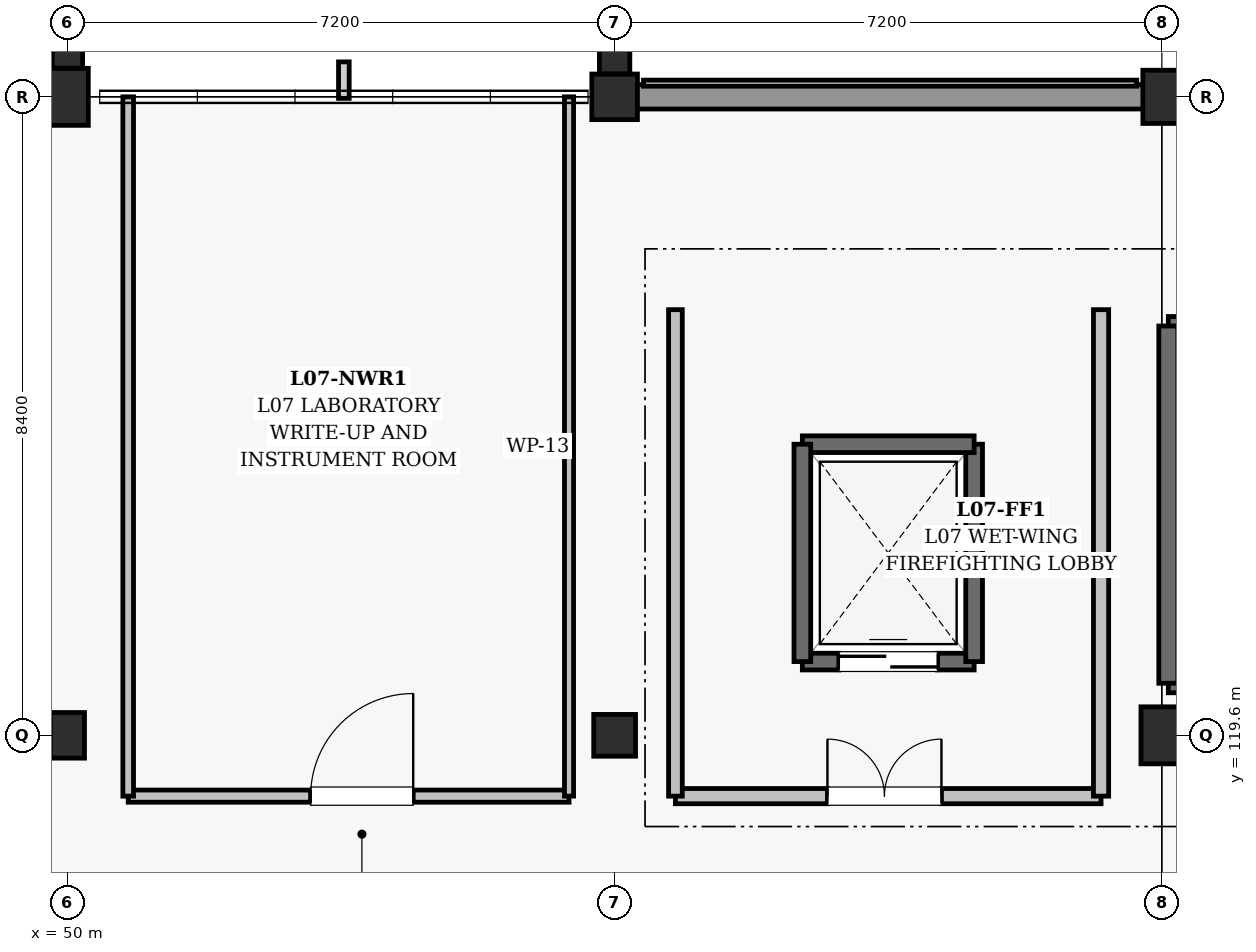
"""IFC4 building model, lengths in metres.
Left out: names, types, materials, properties, quantities, classifications, styles, units other than length and angle.
Written with IfcOpenShell. Run it as: python <this file> out.ifc"""

import sys

from ifc_helpers import new_model, si_unit, direction, frame, frame_2d, origin, origin_2d, place, context, subcontext, project, spatial, rectangle, extrude, element, fill, save


model = new_model("IFC4")
c1 = context("Model", 3, precision=1e-05, world=origin(), true_north=direction((0.0, 1.0)))
c2 = subcontext(c1, "Body", "Model", "MODEL_VIEW")
j1 = project(units=[si_unit("LENGTHUNIT", "METRE"), si_unit("PLANEANGLEUNIT", "RADIAN")], contexts=[c1])
p1 = place(None, origin())
s1 = spatial("IfcSite", under=j1, at=p1, CompositionType="ELEMENT")
p2 = place(p1, origin())
s2 = spatial("IfcBuilding", under=s1, at=p2, CompositionType="ELEMENT")
p3 = place(p2, frame((0.0, 0.0, 32.4)))
s3 = spatial("IfcBuildingStorey", under=s2, at=p3, CompositionType="ELEMENT", Elevation=32.4)
p4 = place(p3, frame((50.0, 119.6, 0.0), z_axis=(0.0, 0.0, 1.0), x_axis=(1.0, 0.0, 0.0)))
e1 = element("IfcColumn", 1, at=p4, inside=s3, PredefinedType="COLUMN", context=c2, shape_type="SweptSolid", body=[
    extrude(rectangle(XDim=0.45, YDim=0.6, at=origin_2d()), origin(), (0.0, 0.0, 1.0), 4.5),
])
p5 = place(p3, frame((50.0, 128.0, 0.0), z_axis=(0.0, 0.0, 1.0), x_axis=(1.0, 0.0, 0.0)))
e2 = element("IfcColumn", 2, at=p5, inside=s3, PredefinedType="COLUMN", context=c2, shape_type="SweptSolid", body=[
    extrude(rectangle(XDim=0.55, YDim=0.75, at=origin_2d()), origin(), (0.0, 0.0, 1.0), 4.5),
])
p6 = place(p3, frame((57.2, 119.6, 0.0), z_axis=(0.0, 0.0, 1.0), x_axis=(1.0, 0.0, 0.0)))
e3 = element("IfcColumn", 3, at=p6, inside=s3, PredefinedType="COLUMN", context=c2, shape_type="SweptSolid", body=[
    extrude(rectangle(XDim=0.55, YDim=0.55, at=origin_2d()), origin(), (0.0, 0.0, 1.0), 4.5),
])
p7 = place(p3, frame((57.2, 128.0, 0.0), z_axis=(0.0, 0.0, 1.0), x_axis=(1.0, 0.0, 0.0)))
e4 = element("IfcColumn", 4, at=p7, inside=s3, PredefinedType="COLUMN", context=c2, shape_type="SweptSolid", body=[
    extrude(rectangle(XDim=0.6, YDim=0.6, at=origin_2d()), origin(), (0.0, 0.0, 1.0), 4.5),
])
p8 = place(p3, frame((64.4, 119.6, 0.0), z_axis=(0.0, 0.0, 1.0), x_axis=(1.0, 0.0, 0.0)))
e5 = element("IfcColumn", 5, at=p8, inside=s3, PredefinedType="COLUMN", context=c2, shape_type="SweptSolid", body=[
    extrude(rectangle(XDim=0.55, YDim=0.75, at=origin_2d()), origin(), (0.0, 0.0, 1.0), 4.5),
])
p9 = place(p3, frame((64.4, 128.0, 0.0), z_axis=(0.0, 0.0, 1.0), x_axis=(1.0, 0.0, 0.0)))
e6 = element("IfcColumn", 6, at=p9, inside=s3, PredefinedType="COLUMN", context=c2, shape_type="SweptSolid", body=[
    extrude(rectangle(XDim=0.5, YDim=0.7, at=origin_2d()), origin(), (0.0, 0.0, 1.0), 4.5),
])
for number, where, z_axis, x_axis in (
    (7, (50.0, 128.678, 0.0), (0.0, 0.0, 1.0), (1.0, 0.0, 0.0)),
    (8, (57.2, 128.603, 0.0), (0.0, 0.0, 1.0), (1.0, 0.0, 0.0)),
):
    element("IfcColumn", number, at=place(p3, frame(where, z_axis=z_axis, x_axis=x_axis)), inside=s3, PredefinedType="PILASTER", context=c2, shape_type="SweptSolid", body=[
        extrude(rectangle(XDim=0.4, YDim=0.6, at=origin_2d()), origin(), (0.0, 0.0, 1.0), 4.5),
    ])
p10 = place(p3, frame((57.48, 128.0, 0.0), z_axis=(0.0, 0.0, 1.0), x_axis=(1.0, 0.0, 0.0)))
e9 = element("IfcWall", 9, at=p10, inside=s3, PredefinedType="SOLIDWALL", context=c2, shape_type="SweptSolid", body=[
    extrude(rectangle(XDim=6.69, YDim=0.32, at=frame_2d((3.345, 0.0))), origin(), (0.0, 0.0, 1.0), 3.305),
])
p11 = place(p3, frame((64.485, 120.285, 0.0), z_axis=(0.0, 0.0, 1.0), x_axis=(1.0, 0.0, 0.0)))
e10 = element("IfcWall", 10, at=p11, inside=s3, PredefinedType="SHEAR", context=c2, shape_type="SweptSolid", body=[
    extrude(rectangle(XDim=10.63, YDim=0.25, at=frame_2d((5.315, 0.0))), origin(), (0.0, 0.0, 1.0), 4.175),
])
p12 = place(p11, frame((0.55, 0.0, 0.0)))
e11 = element("IfcOpeningElement", 11, at=p12, cuts=e10, PredefinedType="OPENING", context=c2, shape_type="SweptSolid", body=[
    extrude(rectangle(XDim=1.2, YDim=2.15, at=frame_2d((0.6, 1.075))), frame((0.0, 0.135, 0.0), z_axis=(0.0, -1.0, 0.0), x_axis=(1.0, 0.0, 0.0)), (0.0, 0.0, 1.0), 0.27),
])
p13 = place(p3, frame((75.115, 124.985, 0.0), z_axis=(0.0, 0.0, 1.0), x_axis=(-1.0, 0.0, 0.0)))
e12 = element("IfcWall", 12, at=p13, inside=s3, PredefinedType="SHEAR", context=c2, shape_type="SweptSolid", body=[
    extrude(rectangle(XDim=10.63, YDim=0.25, at=frame_2d((5.315, 0.0))), origin(), (0.0, 0.0, 1.0), 4.175),
])
p14 = place(p3, frame((64.485, 124.985, 0.0), z_axis=(0.0, 0.0, 1.0), x_axis=(0.0, -1.0, 0.0)))
e13 = element("IfcWall", 13, at=p14, inside=s3, PredefinedType="SHEAR", context=c2, shape_type="SweptSolid", body=[
    extrude(rectangle(XDim=4.7, YDim=0.25, at=frame_2d((2.35, 0.0))), origin(), (0.0, 0.0, 1.0), 4.175),
])
p15 = place(p3, frame((59.67, 120.57, 0.0), z_axis=(0.0, 0.0, 1.0), x_axis=(1.0, 0.0, 0.0)))
e14 = element("IfcWall", 14, at=p15, inside=s3, PredefinedType="SHEAR", context=c2, shape_type="SweptSolid", body=[
    extrude(rectangle(XDim=2.26, YDim=0.22, at=frame_2d((1.13, 0.0))), origin(), (0.0, 0.0, 1.0), 4.175),
])
p16 = place(p15, frame((0.48, 0.0, 0.0)))
e15 = element("IfcOpeningElement", 15, at=p16, cuts=e14, PredefinedType="OPENING", context=c2, shape_type="SweptSolid", body=[
    extrude(rectangle(XDim=1.3, YDim=2.2, at=frame_2d((0.65, 1.1))), frame((0.0, 0.12, 0.0), z_axis=(0.0, -1.0, 0.0), x_axis=(1.0, 0.0, 0.0)), (0.0, 0.0, 1.0), 0.24),
])
p17 = place(p3, frame((61.93, 120.57, 0.0), z_axis=(0.0, 0.0, 1.0), x_axis=(0.0, 1.0, 0.0)))
e16 = element("IfcWall", 16, at=p17, inside=s3, PredefinedType="SHEAR", context=c2, shape_type="SweptSolid", body=[
    extrude(rectangle(XDim=2.86, YDim=0.22, at=frame_2d((1.43, 0.0))), origin(), (0.0, 0.0, 1.0), 4.175),
])
p18 = place(p3, frame((61.93, 123.43, 0.0), z_axis=(0.0, 0.0, 1.0), x_axis=(-1.0, 0.0, 0.0)))
e17 = element("IfcWall", 17, at=p18, inside=s3, PredefinedType="SHEAR", context=c2, shape_type="SweptSolid", body=[
    extrude(rectangle(XDim=2.26, YDim=0.22, at=frame_2d((1.13, 0.0))), origin(), (0.0, 0.0, 1.0), 4.175),
])
p19 = place(p3, frame((59.67, 123.43, 0.0), z_axis=(0.0, 0.0, 1.0), x_axis=(0.0, -1.0, 0.0)))
e18 = element("IfcWall", 18, at=p19, inside=s3, PredefinedType="SHEAR", context=c2, shape_type="SweptSolid", body=[
    extrude(rectangle(XDim=2.86, YDim=0.22, at=frame_2d((1.43, 0.0))), origin(), (0.0, 0.0, 1.0), 4.175),
])
p20 = place(p3, frame((58.0, 118.8, 0.0), z_axis=(0.0, 0.0, 1.0), x_axis=(1.0, 0.0, 0.0)))
e19 = element("IfcWall", 19, at=p20, inside=s3, PredefinedType="SOLIDWALL", context=c2, shape_type="SweptSolid", body=[
    extrude(rectangle(XDim=5.6, YDim=0.2, at=frame_2d((2.8, 0.0))), origin(), (0.0, 0.0, 1.0), 3.54),
])
p21 = place(p20, frame((2.0, 0.0, 0.0)))
e20 = element("IfcOpeningElement", 20, at=p21, cuts=e19, PredefinedType="OPENING", context=c2, shape_type="SweptSolid", body=[
    extrude(rectangle(XDim=1.5, YDim=2.2, at=frame_2d((0.75, 1.1))), frame((0.0, 0.11, 0.0), z_axis=(0.0, -1.0, 0.0), x_axis=(1.0, 0.0, 0.0)), (0.0, 0.0, 1.0), 0.22),
])
p22 = place(p3, frame((58.0, 118.8, 0.0), z_axis=(0.0, 0.0, 1.0), x_axis=(0.0, 1.0, 0.0)))
e21 = element("IfcWall", 21, at=p22, inside=s3, PredefinedType="SOLIDWALL", context=c2, shape_type="SweptSolid", body=[
    extrude(rectangle(XDim=6.4, YDim=0.18, at=frame_2d((3.2, 0.0))), origin(), (0.0, 0.0, 1.0), 3.36),
])
p23 = place(p3, frame((63.6, 118.8, 0.0), z_axis=(0.0, 0.0, 1.0), x_axis=(0.0, 1.0, 0.0)))
e22 = element("IfcWall", 22, at=p23, inside=s3, PredefinedType="SOLIDWALL", context=c2, shape_type="SweptSolid", body=[
    extrude(rectangle(XDim=6.4, YDim=0.2, at=frame_2d((3.2, 0.0))), origin(), (0.0, 0.0, 1.0), 3.36),
])
p24 = place(p3, frame((50.8, 118.8, 0.0), z_axis=(0.0, 0.0, 1.0), x_axis=(1.0, 0.0, 0.0)))
e23 = element("IfcWall", 23, at=p24, inside=s3, PredefinedType="PARTITIONING", context=c2, shape_type="SweptSolid", body=[
    extrude(rectangle(XDim=5.8, YDim=0.16, at=frame_2d((2.9, 0.0))), origin(), (0.0, 0.0, 1.0), 3.54),
])
p25 = place(p24, frame((2.4, 0.0, 0.0)))
e24 = element("IfcOpeningElement", 24, at=p25, cuts=e23, PredefinedType="OPENING", context=c2, shape_type="SweptSolid", body=[
    extrude(rectangle(XDim=1.35, YDim=2.2, at=frame_2d((0.675, 1.1))), frame((0.0, 0.09, 0.0), z_axis=(0.0, -1.0, 0.0), x_axis=(1.0, 0.0, 0.0)), (0.0, 0.0, 1.0), 0.18),
])
p26 = place(p3, frame((50.8, 118.8, 0.0), z_axis=(0.0, 0.0, 1.0), x_axis=(0.0, 1.0, 0.0)))
e25 = element("IfcWall", 25, at=p26, inside=s3, PredefinedType="PARTITIONING", context=c2, shape_type="SweptSolid", body=[
    extrude(rectangle(XDim=9.2, YDim=0.14, at=frame_2d((4.6, 0.0))), origin(), (0.0, 0.0, 1.0), 3.41),
])
p27 = place(p3, frame((56.6, 118.8, 0.0), z_axis=(0.0, 0.0, 1.0), x_axis=(0.0, 1.0, 0.0)))
e26 = element("IfcWall", 26, at=p27, inside=s3, PredefinedType="PARTITIONING", context=c2, shape_type="SweptSolid", body=[
    extrude(rectangle(XDim=9.2, YDim=0.12, at=frame_2d((4.6, 0.0))), origin(), (0.0, 0.0, 1.0), 3.41),
])
p28 = place(p16, origin())
e27 = element("IfcDoor", 27, at=p28, inside=s3, OperationType="DOUBLE_DOOR_SLIDING", PredefinedType="DOOR", context=c2, shape_type="SweptSolid", body=[
    extrude(rectangle(XDim=1.3, YDim=2.2, at=frame_2d((0.65, 1.1))), frame((0.0, 0.025, 0.0), z_axis=(0.0, -1.0, 0.0), x_axis=(1.0, 0.0, 0.0)), (0.0, 0.0, 1.0), 0.05),
])
fill(e15, e27)
p29 = place(p21, origin())
e28 = element("IfcDoor", 28, at=p29, inside=s3, OperationType="DOUBLE_DOOR_SINGLE_SWING", PredefinedType="DOOR", context=c2, shape_type="SweptSolid", body=[
    extrude(rectangle(XDim=1.5, YDim=2.2, at=frame_2d((0.75, 1.1))), frame((0.0, 0.025, 0.0), z_axis=(0.0, -1.0, 0.0), x_axis=(1.0, 0.0, 0.0)), (0.0, 0.0, 1.0), 0.05),
])
fill(e20, e28)
p30 = place(p25, origin())
e29 = element("IfcDoor", 29, at=p30, inside=s3, OperationType="SINGLE_SWING_RIGHT", PredefinedType="DOOR", context=c2, shape_type="SweptSolid", body=[
    extrude(rectangle(XDim=1.35, YDim=2.2, at=frame_2d((0.675, 1.1))), frame((0.0, 0.025, 0.0), z_axis=(0.0, -1.0, 0.0), x_axis=(1.0, 0.0, 0.0)), (0.0, 0.0, 1.0), 0.05),
])
fill(e24, e29)
save(model, sys.argv[1])
